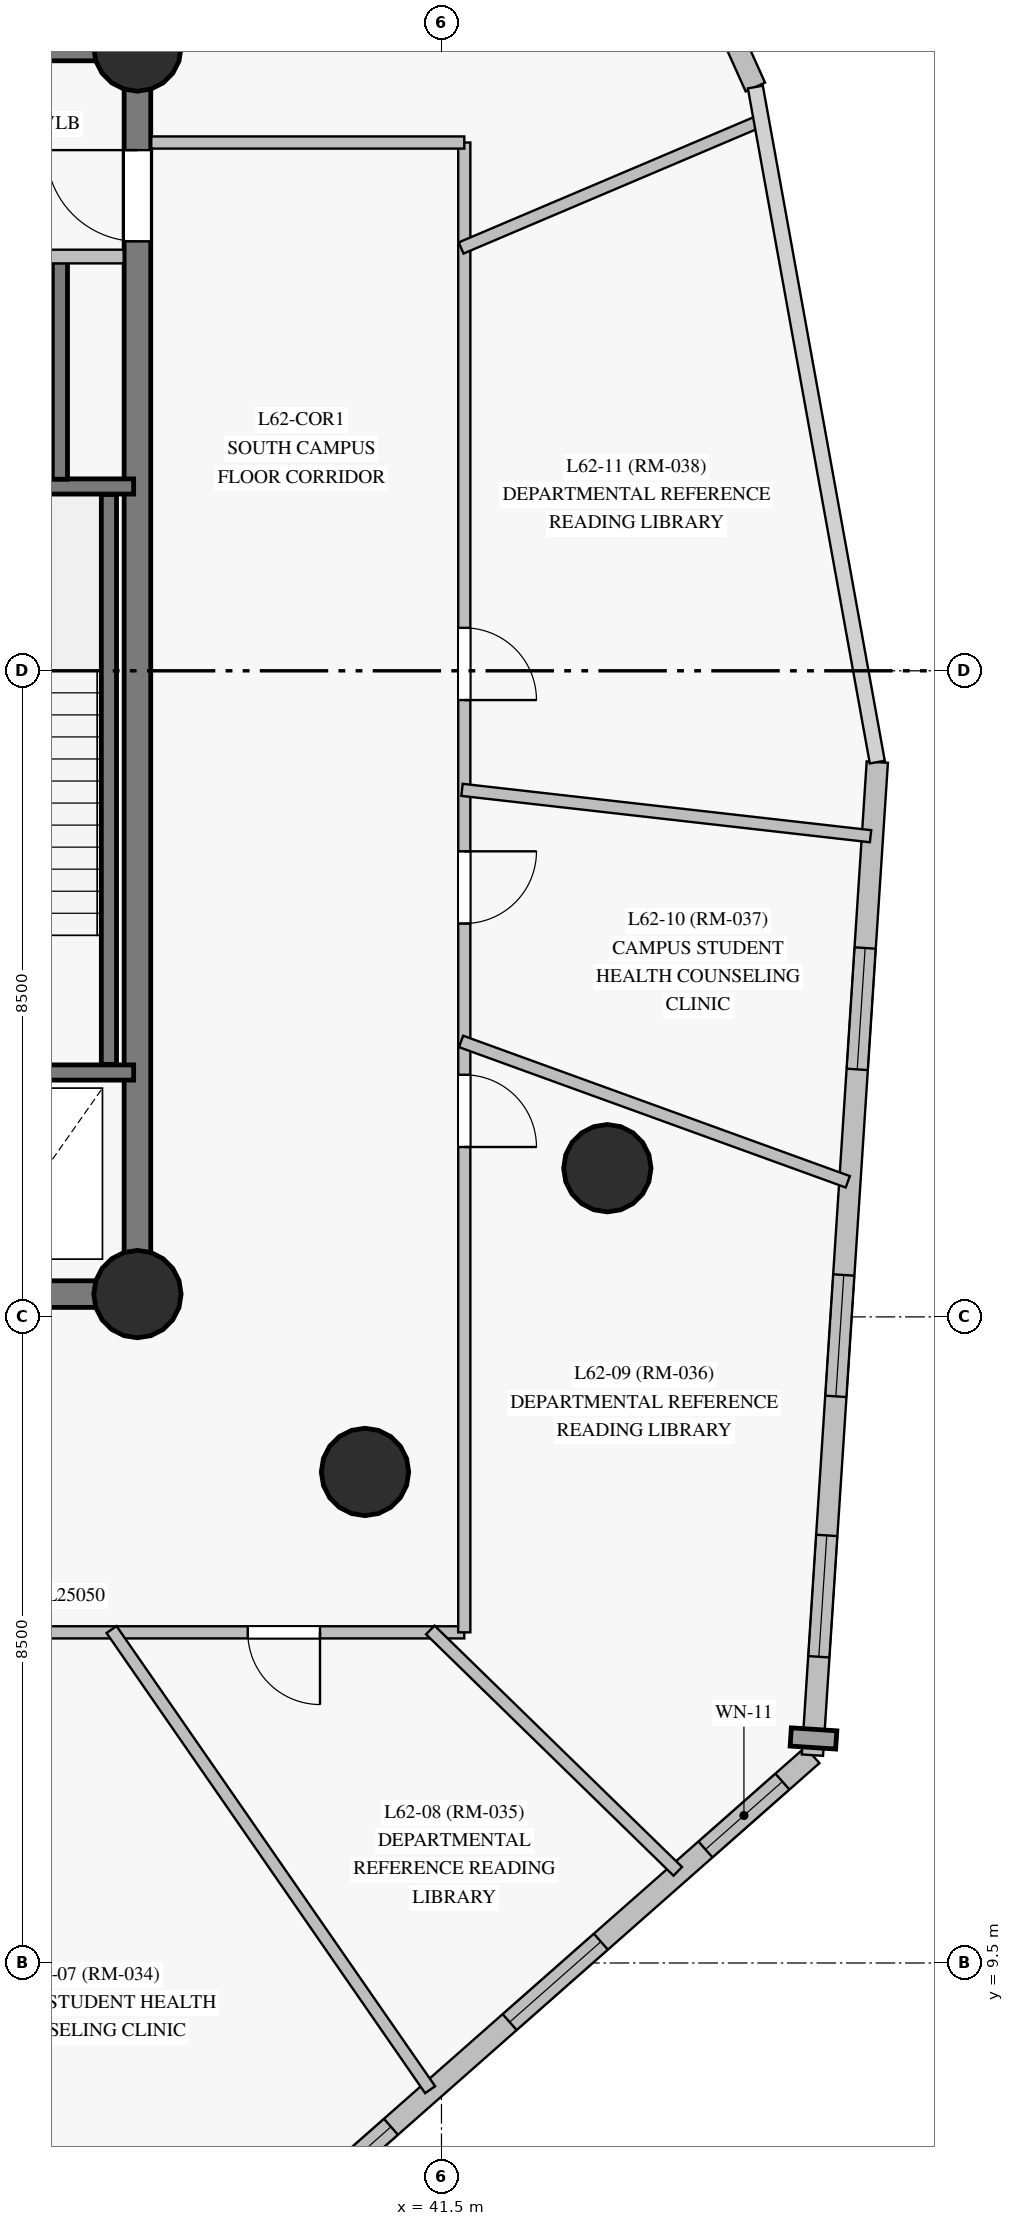
"""IFC4 building model, lengths in metres.
Left out: names, types, materials, properties, quantities, classifications, styles, units other than length and angle.
Written with IfcOpenShell. Run it as: python <this file> out.ifc"""

import sys

from ifc_helpers import new_model, si_unit, direction, frame, frame_2d, origin, origin_with_axes, origin_2d, place, context, subcontext, project, spatial, rectangle, circle, extrude, source, transform, mapped, element, fill, save


model = new_model("IFC4")
c1 = context("Model", 3, precision=1e-05, world=origin(), true_north=direction((0.0, 1.0)))
c2 = subcontext(c1, "Body", "Model", "MODEL_VIEW")
j1 = project(units=[si_unit("LENGTHUNIT", "METRE"), si_unit("PLANEANGLEUNIT", "RADIAN")], contexts=[c1])
p1 = place(None, origin())
s1 = spatial("IfcSite", under=j1, at=p1, CompositionType="ELEMENT")
p2 = place(p1, origin())
s2 = spatial("IfcBuilding", under=s1, at=p2, CompositionType="ELEMENT")
p3 = place(p2, frame((0.0, 0.0, 212.9)))
s3 = spatial("IfcBuildingStorey", under=s2, at=p3, CompositionType="ELEMENT", Elevation=212.9)
p4 = place(p3, frame((26.55, 18.3, 0.0), z_axis=(0.0, 0.0, 1.0), x_axis=(1.0, 0.0, 0.0)))
e1 = element("IfcWall", 1, at=p4, inside=s3, PredefinedType="SHEAR", context=c2, shape_type="SweptSolid", body=[
    extrude(rectangle(XDim=10.95, YDim=0.35, at=frame_2d((5.475, 0.0))), origin(), (0.0, 0.0, 1.0), 3.8),
])
p5 = place(p4, frame((4.55, 0.0, 0.0)))
e2 = element("IfcOpeningElement", 2, at=p5, cuts=e1, PredefinedType="OPENING", context=c2, shape_type="SweptSolid", body=[
    extrude(rectangle(XDim=1.4, YDim=2.2, at=frame_2d((0.7, 1.1))), frame((0.0, 0.185, 0.0), z_axis=(0.0, -1.0, 0.0), x_axis=(1.0, 0.0, 0.0)), (0.0, 0.0, 1.0), 0.37),
])
p6 = place(p3, frame((37.5, 18.3, 0.0), z_axis=(0.0, 0.0, 1.0), x_axis=(0.0, 1.0, 0.0)))
e3 = element("IfcWall", 3, at=p6, inside=s3, PredefinedType="SHEAR", context=c2, shape_type="SweptSolid", body=[
    extrude(rectangle(XDim=16.4, YDim=0.35, at=frame_2d((8.2, 0.0))), origin(), (0.0, 0.0, 1.0), 3.8),
])
p7 = place(p6, frame((13.85, 0.0, 0.0)))
e4 = element("IfcOpeningElement", 4, at=p7, cuts=e3, PredefinedType="OPENING", context=c2, shape_type="SweptSolid", body=[
    extrude(rectangle(XDim=1.2, YDim=2.15, at=frame_2d((0.6, 1.075))), frame((0.0, 0.185, 0.0), z_axis=(0.0, -1.0, 0.0), x_axis=(1.0, 0.0, 0.0)), (0.0, 0.0, 1.0), 0.37),
])
p8 = place(p3, frame((37.5, 34.7, 0.0), z_axis=(0.0, 0.0, 1.0), x_axis=(-1.0, 0.0, 0.0)))
e5 = element("IfcWall", 5, at=p8, inside=s3, PredefinedType="SHEAR", context=c2, shape_type="SweptSolid", body=[
    extrude(rectangle(XDim=10.95, YDim=0.35, at=frame_2d((5.475, 0.0))), origin(), (0.0, 0.0, 1.0), 3.8),
])
p9 = place(p8, frame((2.15, 0.0, 0.0)))
e6 = element("IfcOpeningElement", 6, at=p9, cuts=e5, PredefinedType="OPENING", context=c2, shape_type="SweptSolid", body=[
    extrude(rectangle(XDim=1.2, YDim=2.15, at=frame_2d((0.6, 1.075))), frame((0.0, 0.185, 0.0), z_axis=(0.0, -1.0, 0.0), x_axis=(1.0, 0.0, 0.0)), (0.0, 0.0, 1.0), 0.37),
])
p10 = place(p8, frame((6.35, 0.0, 0.0)))
e7 = element("IfcOpeningElement", 7, at=p10, cuts=e5, PredefinedType="OPENING", context=c2, shape_type="SweptSolid", body=[
    extrude(rectangle(XDim=1.1, YDim=2.15, at=frame_2d((0.55, 1.075))), frame((0.0, 0.185, 0.0), z_axis=(0.0, -1.0, 0.0), x_axis=(1.0, 0.0, 0.0)), (0.0, 0.0, 1.0), 0.37),
])
m1 = source(origin_with_axes(), c2, "Body", "SweptSolid", [
    extrude(circle(Radius=0.575, at=origin_2d()), origin(), (0.0, 0.0, 1.0), 4.0),
])
for number, where, z_axis, x_axis in (
    (8, (37.5, 18.3, 0.0), (0.0, 0.0, 1.0), (1.0, 0.0, 0.0)),
    (9, (37.5, 34.7, 0.0), (0.0, 0.0, 1.0), (1.0, 0.0, 0.0)),
    (10, (43.682, 19.956, 0.0), (0.0, 0.0, 1.0), (1.0, 0.0, 0.0)),
    (11, (40.494, 15.96, 0.0), (0.0, 0.0, 1.0), (1.0, 0.0, 0.0)),
):
    element("IfcColumn", number, at=place(p3, frame(where, z_axis=z_axis, x_axis=x_axis)), inside=s3, PredefinedType="COLUMN", context=c2, shape_type="MappedRepresentation", body=[
        mapped(m1, transform((0.0, 0.0, 0.0), scale=1.0)),
    ])
p11 = place(p3, frame((39.055, 5.775, 0.0), z_axis=(0.0, 0.0, 1.0), x_axis=(0.750017300643, 0.661418210164, 0.0)))
e12 = element("IfcWall", 12, at=p11, inside=s3, PredefinedType="SOLIDWALL", context=c2, shape_type="SweptSolid", body=[
    extrude(rectangle(XDim=9.766, YDim=0.28, at=frame_2d((4.883, 0.0))), origin(), (0.0, 0.0, 1.0), 3.8),
])
p12 = place(p11, frame((0.773, 0.0, 0.85)))
e13 = element("IfcOpeningElement", 13, at=p12, cuts=e12, PredefinedType="OPENING", context=c2, shape_type="SweptSolid", body=[
    extrude(rectangle(XDim=1.6, YDim=1.6, at=frame_2d((0.8, 0.8))), frame((0.0, 0.15, 0.0), z_axis=(0.0, -1.0, 0.0), x_axis=(1.0, 0.0, 0.0)), (0.0, 0.0, 1.0), 0.3),
])
p13 = place(p11, frame((4.455, 0.0, 0.85)))
e14 = element("IfcOpeningElement", 14, at=p13, cuts=e12, PredefinedType="OPENING", context=c2, shape_type="SweptSolid", body=[
    extrude(rectangle(XDim=1.6, YDim=1.6, at=frame_2d((0.8, 0.8))), frame((0.0, 0.15, 0.0), z_axis=(0.0, -1.0, 0.0), x_axis=(1.0, 0.0, 0.0)), (0.0, 0.0, 1.0), 0.3),
])
p14 = place(p11, frame((7.89, 0.0, 0.85)))
e15 = element("IfcOpeningElement", 15, at=p14, cuts=e12, PredefinedType="OPENING", context=c2, shape_type="SweptSolid", body=[
    extrude(rectangle(XDim=1.35, YDim=1.6, at=frame_2d((0.675, 0.8))), frame((0.0, 0.15, 0.0), z_axis=(0.0, -1.0, 0.0), x_axis=(1.0, 0.0, 0.0)), (0.0, 0.0, 1.0), 0.3),
])
p15 = place(p3, frame((46.38, 12.235, 0.0), z_axis=(0.0, 0.0, 1.0), x_axis=(0.065231727885, 0.997870142692, 0.0)))
e16 = element("IfcWall", 16, at=p15, inside=s3, PredefinedType="SOLIDWALL", context=c2, shape_type="SweptSolid", body=[
    extrude(rectangle(XDim=13.092, YDim=0.28, at=frame_2d((6.546, 0.0))), origin(), (0.0, 0.0, 1.0), 3.8),
])
p16 = place(p15, frame((1.297, 0.0, 0.85)))
e17 = element("IfcOpeningElement", 17, at=p16, cuts=e16, PredefinedType="OPENING", context=c2, shape_type="SweptSolid", body=[
    extrude(rectangle(XDim=1.6, YDim=1.6, at=frame_2d((0.8, 0.8))), frame((0.0, 0.15, 0.0), z_axis=(0.0, -1.0, 0.0), x_axis=(1.0, 0.0, 0.0)), (0.0, 0.0, 1.0), 0.3),
])
p17 = place(p15, frame((4.73, 0.0, 0.85)))
e18 = element("IfcOpeningElement", 18, at=p17, cuts=e16, PredefinedType="OPENING", context=c2, shape_type="SweptSolid", body=[
    extrude(rectangle(XDim=1.6, YDim=1.6, at=frame_2d((0.8, 0.8))), frame((0.0, 0.15, 0.0), z_axis=(0.0, -1.0, 0.0), x_axis=(1.0, 0.0, 0.0)), (0.0, 0.0, 1.0), 0.3),
])
p18 = place(p15, frame((9.041, 0.0, 0.85)))
e19 = element("IfcOpeningElement", 19, at=p18, cuts=e16, PredefinedType="OPENING", context=c2, shape_type="SweptSolid", body=[
    extrude(rectangle(XDim=1.6, YDim=1.6, at=frame_2d((0.8, 0.8))), frame((0.0, 0.15, 0.0), z_axis=(0.0, -1.0, 0.0), x_axis=(1.0, 0.0, 0.0)), (0.0, 0.0, 1.0), 0.3),
])
p19 = place(p3, frame((45.629, 34.18, 0.0), z_axis=(0.0, 0.0, 1.0), x_axis=(-0.410221225216, 0.911986045059, 0.0)))
e20 = element("IfcWall", 20, at=p19, inside=s3, PredefinedType="SOLIDWALL", context=c2, shape_type="SweptSolid", body=[
    extrude(rectangle(XDim=13.092, YDim=0.28, at=frame_2d((6.546, 0.0))), origin(), (0.0, 0.0, 1.0), 3.8),
])
p20 = place(p19, frame((1.635, 0.0, 0.85)))
e21 = element("IfcOpeningElement", 21, at=p20, cuts=e20, PredefinedType="OPENING", context=c2, shape_type="SweptSolid", body=[
    extrude(rectangle(XDim=1.6, YDim=1.6, at=frame_2d((0.8, 0.8))), frame((0.0, 0.15, 0.0), z_axis=(0.0, -1.0, 0.0), x_axis=(1.0, 0.0, 0.0)), (0.0, 0.0, 1.0), 0.3),
])
p21 = place(p19, frame((5.746, 0.0, 0.85)))
e22 = element("IfcOpeningElement", 22, at=p21, cuts=e20, PredefinedType="OPENING", context=c2, shape_type="SweptSolid", body=[
    extrude(rectangle(XDim=1.6, YDim=1.6, at=frame_2d((0.8, 0.8))), frame((0.0, 0.15, 0.0), z_axis=(0.0, -1.0, 0.0), x_axis=(1.0, 0.0, 0.0)), (0.0, 0.0, 1.0), 0.3),
])
p22 = place(p19, frame((9.857, 0.0, 0.85)))
e23 = element("IfcOpeningElement", 23, at=p22, cuts=e20, PredefinedType="OPENING", context=c2, shape_type="SweptSolid", body=[
    extrude(rectangle(XDim=1.6, YDim=1.6, at=frame_2d((0.8, 0.8))), frame((0.0, 0.15, 0.0), z_axis=(0.0, -1.0, 0.0), x_axis=(1.0, 0.0, 0.0)), (0.0, 0.0, 1.0), 0.3),
])
p23 = place(p3, frame((37.125, 21.32, 0.0), z_axis=(0.0, 0.0, 1.0), x_axis=(0.0, 1.0, 0.0)))
e24 = element("IfcWall", 24, at=p23, inside=s3, PredefinedType="SHEAR", context=c2, shape_type="SweptSolid", body=[
    extrude(rectangle(XDim=7.5, YDim=0.2, at=frame_2d((3.75, 0.0))), origin(), (0.0, 0.0, 1.0), 3.8),
])
for number, where, z_axis, x_axis in (
    (25, (33.455, 21.215, 0.0), (0.0, 0.0, 1.0), (1.0, 0.0, 0.0)),
    (26, (33.455, 28.925, 0.0), (0.0, 0.0, 1.0), (1.0, 0.0, 0.0)),
):
    element("IfcWall", number, at=place(p3, frame(where, z_axis=z_axis, x_axis=x_axis)), inside=s3, PredefinedType="SHEAR", context=c2, shape_type="SweptSolid", body=[
        extrude(rectangle(XDim=3.995, YDim=0.2, at=frame_2d((1.998, 0.0))), origin(), (0.0, 0.0, 1.0), 3.8),
    ])
p24 = place(p3, frame((36.48, 29.02, 0.0), z_axis=(0.0, 0.0, 1.0), x_axis=(0.0, 1.0, 0.0)))
e27 = element("IfcWall", 27, at=p24, inside=s3, PredefinedType="SHEAR", context=c2, shape_type="SweptSolid", body=[
    extrude(rectangle(XDim=2.86, YDim=0.2, at=frame_2d((1.43, 0.0))), origin(), (0.0, 0.0, 1.0), 3.8),
])
p25 = place(p3, frame((41.8, 13.85, 0.0), z_axis=(0.0, 0.0, 1.0), x_axis=(-1.0, 0.0, 0.0)))
e28 = element("IfcWall", 28, at=p25, inside=s3, PredefinedType="PARTITIONING", context=c2, shape_type="SweptSolid", body=[
    extrude(rectangle(XDim=25.05, YDim=0.16, at=frame_2d((12.525, 0.0))), origin(), (0.0, 0.0, 1.0), 3.25),
])
p26 = place(p25, frame((18.752, 0.0, 0.0)))
e29 = element("IfcOpeningElement", 29, at=p26, cuts=e28, PredefinedType="OPENING", context=c2, shape_type="SweptSolid", body=[
    extrude(rectangle(XDim=0.95, YDim=2.15, at=frame_2d((0.475, 1.075))), frame((0.0, 0.09, 0.0), z_axis=(0.0, -1.0, 0.0), x_axis=(1.0, 0.0, 0.0)), (0.0, 0.0, 1.0), 0.18),
])
p27 = place(p25, frame((15.808, 0.0, 0.0)))
e30 = element("IfcOpeningElement", 30, at=p27, cuts=e28, PredefinedType="OPENING", context=c2, shape_type="SweptSolid", body=[
    extrude(rectangle(XDim=0.95, YDim=2.15, at=frame_2d((0.475, 1.075))), frame((0.0, 0.09, 0.0), z_axis=(0.0, -1.0, 0.0), x_axis=(1.0, 0.0, 0.0)), (0.0, 0.0, 1.0), 0.18),
])
p28 = place(p25, frame((13.594, 0.0, 0.0)))
e31 = element("IfcOpeningElement", 31, at=p28, cuts=e28, PredefinedType="OPENING", context=c2, shape_type="SweptSolid", body=[
    extrude(rectangle(XDim=0.95, YDim=2.15, at=frame_2d((0.475, 1.075))), frame((0.0, 0.09, 0.0), z_axis=(0.0, -1.0, 0.0), x_axis=(1.0, 0.0, 0.0)), (0.0, 0.0, 1.0), 0.18),
])
p29 = place(p25, frame((11.51, 0.0, 0.0)))
e32 = element("IfcOpeningElement", 32, at=p29, cuts=e28, PredefinedType="OPENING", context=c2, shape_type="SweptSolid", body=[
    extrude(rectangle(XDim=0.95, YDim=2.15, at=frame_2d((0.475, 1.075))), frame((0.0, 0.09, 0.0), z_axis=(0.0, -1.0, 0.0), x_axis=(1.0, 0.0, 0.0)), (0.0, 0.0, 1.0), 0.18),
])
p30 = place(p25, frame((8.292, 0.0, 0.0)))
e33 = element("IfcOpeningElement", 33, at=p30, cuts=e28, PredefinedType="OPENING", context=c2, shape_type="SweptSolid", body=[
    extrude(rectangle(XDim=0.95, YDim=2.15, at=frame_2d((0.475, 1.075))), frame((0.0, 0.09, 0.0), z_axis=(0.0, -1.0, 0.0), x_axis=(1.0, 0.0, 0.0)), (0.0, 0.0, 1.0), 0.18),
])
p31 = place(p25, frame((1.898, 0.0, 0.0)))
e34 = element("IfcOpeningElement", 34, at=p31, cuts=e28, PredefinedType="OPENING", context=c2, shape_type="SweptSolid", body=[
    extrude(rectangle(XDim=0.95, YDim=2.15, at=frame_2d((0.475, 1.075))), frame((0.0, 0.09, 0.0), z_axis=(0.0, -1.0, 0.0), x_axis=(1.0, 0.0, 0.0)), (0.0, 0.0, 1.0), 0.18),
])
p32 = place(p3, frame((41.8, 33.45, 0.0), z_axis=(0.0, 0.0, 1.0), x_axis=(0.0, -1.0, 0.0)))
e35 = element("IfcWall", 35, at=p32, inside=s3, PredefinedType="PARTITIONING", context=c2, shape_type="SweptSolid", body=[
    extrude(rectangle(XDim=19.6, YDim=0.16, at=frame_2d((9.8, 0.0))), origin(), (0.0, 0.0, 1.0), 3.25),
])
p33 = place(p32, frame((12.265, 0.0, 0.0)))
e36 = element("IfcOpeningElement", 36, at=p33, cuts=e35, PredefinedType="OPENING", context=c2, shape_type="SweptSolid", body=[
    extrude(rectangle(XDim=0.95, YDim=2.15, at=frame_2d((0.475, 1.075))), frame((0.0, 0.09, 0.0), z_axis=(0.0, -1.0, 0.0), x_axis=(1.0, 0.0, 0.0)), (0.0, 0.0, 1.0), 0.18),
])
p34 = place(p32, frame((9.325, 0.0, 0.0)))
e37 = element("IfcOpeningElement", 37, at=p34, cuts=e35, PredefinedType="OPENING", context=c2, shape_type="SweptSolid", body=[
    extrude(rectangle(XDim=0.95, YDim=2.15, at=frame_2d((0.475, 1.075))), frame((0.0, 0.09, 0.0), z_axis=(0.0, -1.0, 0.0), x_axis=(1.0, 0.0, 0.0)), (0.0, 0.0, 1.0), 0.18),
])
p35 = place(p32, frame((6.385, 0.0, 0.0)))
e38 = element("IfcOpeningElement", 38, at=p35, cuts=e35, PredefinedType="OPENING", context=c2, shape_type="SweptSolid", body=[
    extrude(rectangle(XDim=0.95, YDim=2.15, at=frame_2d((0.475, 1.075))), frame((0.0, 0.09, 0.0), z_axis=(0.0, -1.0, 0.0), x_axis=(1.0, 0.0, 0.0)), (0.0, 0.0, 1.0), 0.18),
])
p36 = place(p3, frame((37.159, 13.887, 0.0), z_axis=(0.0, 0.0, 1.0), x_axis=(0.569228944135, -0.822179061494, 0.0)))
e39 = element("IfcWall", 39, at=p36, inside=s3, PredefinedType="PARTITIONING", context=c2, shape_type="SweptSolid", body=[
    extrude(rectangle(XDim=7.363, YDim=0.16, at=frame_2d((3.682, 0.0))), origin(), (0.0, 0.0, 1.0), 3.8),
])
p37 = place(p3, frame((41.77, 24.934, 0.0), z_axis=(0.0, 0.0, 1.0), x_axis=(0.993623998943, -0.112744617277, 0.0)))
e40 = element("IfcWall", 40, at=p37, inside=s3, PredefinedType="PARTITIONING", context=c2, shape_type="SweptSolid", body=[
    extrude(rectangle(XDim=5.409, YDim=0.16, at=frame_2d((2.705, 0.0))), origin(), (0.0, 0.0, 1.0), 3.8),
])
p38 = place(p3, frame((41.758, 21.624, 0.0), z_axis=(0.0, 0.0, 1.0), x_axis=(0.939993446989, -0.341192496426, 0.0)))
e41 = element("IfcWall", 41, at=p38, inside=s3, PredefinedType="PARTITIONING", context=c2, shape_type="SweptSolid", body=[
    extrude(rectangle(XDim=5.412, YDim=0.16, at=frame_2d((2.706, 0.0))), origin(), (0.0, 0.0, 1.0), 3.8),
])
p39 = place(p3, frame((41.353, 13.881, 0.0), z_axis=(0.0, 0.0, 1.0), x_axis=(0.715908902614, -0.698193700314, 0.0)))
e42 = element("IfcWall", 42, at=p39, inside=s3, PredefinedType="PARTITIONING", context=c2, shape_type="SweptSolid", body=[
    extrude(rectangle(XDim=4.548, YDim=0.16, at=frame_2d((2.274, 0.0))), origin(), (0.0, 0.0, 1.0), 3.8),
])
p40 = place(p3, frame((41.759, 32.063, 0.0), z_axis=(0.0, 0.0, 1.0), x_axis=(0.920507541963, 0.390724794695, 0.0)))
e43 = element("IfcWall", 43, at=p40, inside=s3, PredefinedType="PARTITIONING", context=c2, shape_type="SweptSolid", body=[
    extrude(rectangle(XDim=4.265, YDim=0.16, at=frame_2d((2.132, 0.0))), origin(), (0.0, 0.0, 1.0), 3.8),
])
p41 = place(p3, frame((37.682, 33.45, 0.0), z_axis=(0.0, 0.0, 1.0), x_axis=(1.0, 0.0, 0.0)))
e44 = element("IfcWall", 44, at=p41, inside=s3, PredefinedType="PARTITIONING", context=c2, shape_type="SweptSolid", body=[
    extrude(rectangle(XDim=4.118, YDim=0.16, at=frame_2d((2.059, 0.0))), origin(), (0.0, 0.0, 1.0), 3.8),
])
p42 = place(p3, frame((33.535, 31.95, 0.0), z_axis=(0.0, 0.0, 1.0), x_axis=(1.0, 0.0, 0.0)))
e45 = element("IfcWall", 45, at=p42, inside=s3, PredefinedType="PARTITIONING", context=c2, shape_type="SweptSolid", body=[
    extrude(rectangle(XDim=3.784, YDim=0.18, at=frame_2d((1.892, 0.0))), origin(), (0.0, 0.0, 1.0), 3.8),
])
p43 = place(p42, frame((0.9, 0.0, 0.0)))
e46 = element("IfcOpeningElement", 46, at=p43, cuts=e45, PredefinedType="OPENING", context=c2, shape_type="SweptSolid", body=[
    extrude(rectangle(XDim=1.3, YDim=2.2, at=frame_2d((0.65, 1.1))), frame((0.0, 0.1, 0.0), z_axis=(0.0, -1.0, 0.0), x_axis=(1.0, 0.0, 0.0)), (0.0, 0.0, 1.0), 0.2),
])
m2 = source(origin_with_axes(), c2, "Body", "SweptSolid", [
    extrude(rectangle(XDim=1.6, YDim=1.6, at=frame_2d((0.8, 0.8))), frame((0.0, 0.03, 0.0), z_axis=(0.0, -1.0, 0.0), x_axis=(1.0, 0.0, 0.0)), (0.0, 0.0, 1.0), 0.06),
])
p44 = place(p12, origin())
e47 = element("IfcWindow", 47, at=p44, inside=s3, PartitioningType="SINGLE_PANEL", PredefinedType="WINDOW", context=c2, shape_type="MappedRepresentation", body=[
    mapped(m2, transform((0.0, 0.0, 0.0), scale=1.0)),
])
fill(e13, e47)
p45 = place(p13, origin())
e48 = element("IfcWindow", 48, at=p45, inside=s3, PartitioningType="SINGLE_PANEL", PredefinedType="WINDOW", context=c2, shape_type="MappedRepresentation", body=[
    mapped(m2, transform((0.0, 0.0, 0.0), scale=1.0)),
])
fill(e14, e48)
m3 = source(origin_with_axes(), c2, "Body", "SweptSolid", [
    extrude(rectangle(XDim=1.35, YDim=1.6, at=frame_2d((0.675, 0.8))), frame((0.0, 0.03, 0.0), z_axis=(0.0, -1.0, 0.0), x_axis=(1.0, 0.0, 0.0)), (0.0, 0.0, 1.0), 0.06),
])
p46 = place(p14, origin())
e49 = element("IfcWindow", 49, at=p46, inside=s3, PartitioningType="SINGLE_PANEL", PredefinedType="WINDOW", context=c2, shape_type="MappedRepresentation", body=[
    mapped(m3, transform((0.0, 0.0, 0.0), scale=1.0)),
])
fill(e15, e49)
p47 = place(p16, origin())
e50 = element("IfcWindow", 50, at=p47, inside=s3, PartitioningType="SINGLE_PANEL", PredefinedType="WINDOW", context=c2, shape_type="MappedRepresentation", body=[
    mapped(m2, transform((0.0, 0.0, 0.0), scale=1.0)),
])
fill(e17, e50)
p48 = place(p17, origin())
e51 = element("IfcWindow", 51, at=p48, inside=s3, PartitioningType="SINGLE_PANEL", PredefinedType="WINDOW", context=c2, shape_type="MappedRepresentation", body=[
    mapped(m2, transform((0.0, 0.0, 0.0), scale=1.0)),
])
fill(e18, e51)
p49 = place(p18, origin())
e52 = element("IfcWindow", 52, at=p49, inside=s3, PartitioningType="SINGLE_PANEL", PredefinedType="WINDOW", context=c2, shape_type="MappedRepresentation", body=[
    mapped(m2, transform((0.0, 0.0, 0.0), scale=1.0)),
])
fill(e19, e52)
m4 = source(origin_with_axes(), c2, "Body", "SweptSolid", [
    extrude(rectangle(XDim=1.2, YDim=2.15, at=frame_2d((0.6, 1.075))), frame((0.0, 0.025, 0.0), z_axis=(0.0, -1.0, 0.0), x_axis=(1.0, 0.0, 0.0)), (0.0, 0.0, 1.0), 0.05),
])
p50 = place(p7, origin())
e53 = element("IfcDoor", 53, at=p50, inside=s3, OperationType="SINGLE_SWING_RIGHT", PredefinedType="DOOR", context=c2, shape_type="MappedRepresentation", body=[
    mapped(m4, transform((0.0, 0.0, 0.0), scale=1.0)),
])
fill(e4, e53)
m5 = source(origin_with_axes(), c2, "Body", "SweptSolid", [
    extrude(rectangle(XDim=0.95, YDim=2.15, at=frame_2d((0.475, 1.075))), frame((0.0, 0.025, 0.0), z_axis=(0.0, -1.0, 0.0), x_axis=(1.0, 0.0, 0.0)), (0.0, 0.0, 1.0), 0.05),
])
p51 = place(p31, origin())
e54 = element("IfcDoor", 54, at=p51, inside=s3, OperationType="SINGLE_SWING_LEFT", PredefinedType="DOOR", context=c2, shape_type="MappedRepresentation", body=[
    mapped(m5, transform((0.0, 0.0, 0.0), scale=1.0)),
])
fill(e34, e54)
p52 = place(p33, origin())
e55 = element("IfcDoor", 55, at=p52, inside=s3, OperationType="SINGLE_SWING_RIGHT", PredefinedType="DOOR", context=c2, shape_type="MappedRepresentation", body=[
    mapped(m5, transform((0.0, 0.0, 0.0), scale=1.0)),
])
fill(e36, e55)
p53 = place(p34, origin())
e56 = element("IfcDoor", 56, at=p53, inside=s3, OperationType="SINGLE_SWING_LEFT", PredefinedType="DOOR", context=c2, shape_type="MappedRepresentation", body=[
    mapped(m5, transform((0.0, 0.0, 0.0), scale=1.0)),
])
fill(e37, e56)
p54 = place(p35, origin())
e57 = element("IfcDoor", 57, at=p54, inside=s3, OperationType="SINGLE_SWING_RIGHT", PredefinedType="DOOR", context=c2, shape_type="MappedRepresentation", body=[
    mapped(m5, transform((0.0, 0.0, 0.0), scale=1.0)),
])
fill(e38, e57)
save(model, sys.argv[1])
